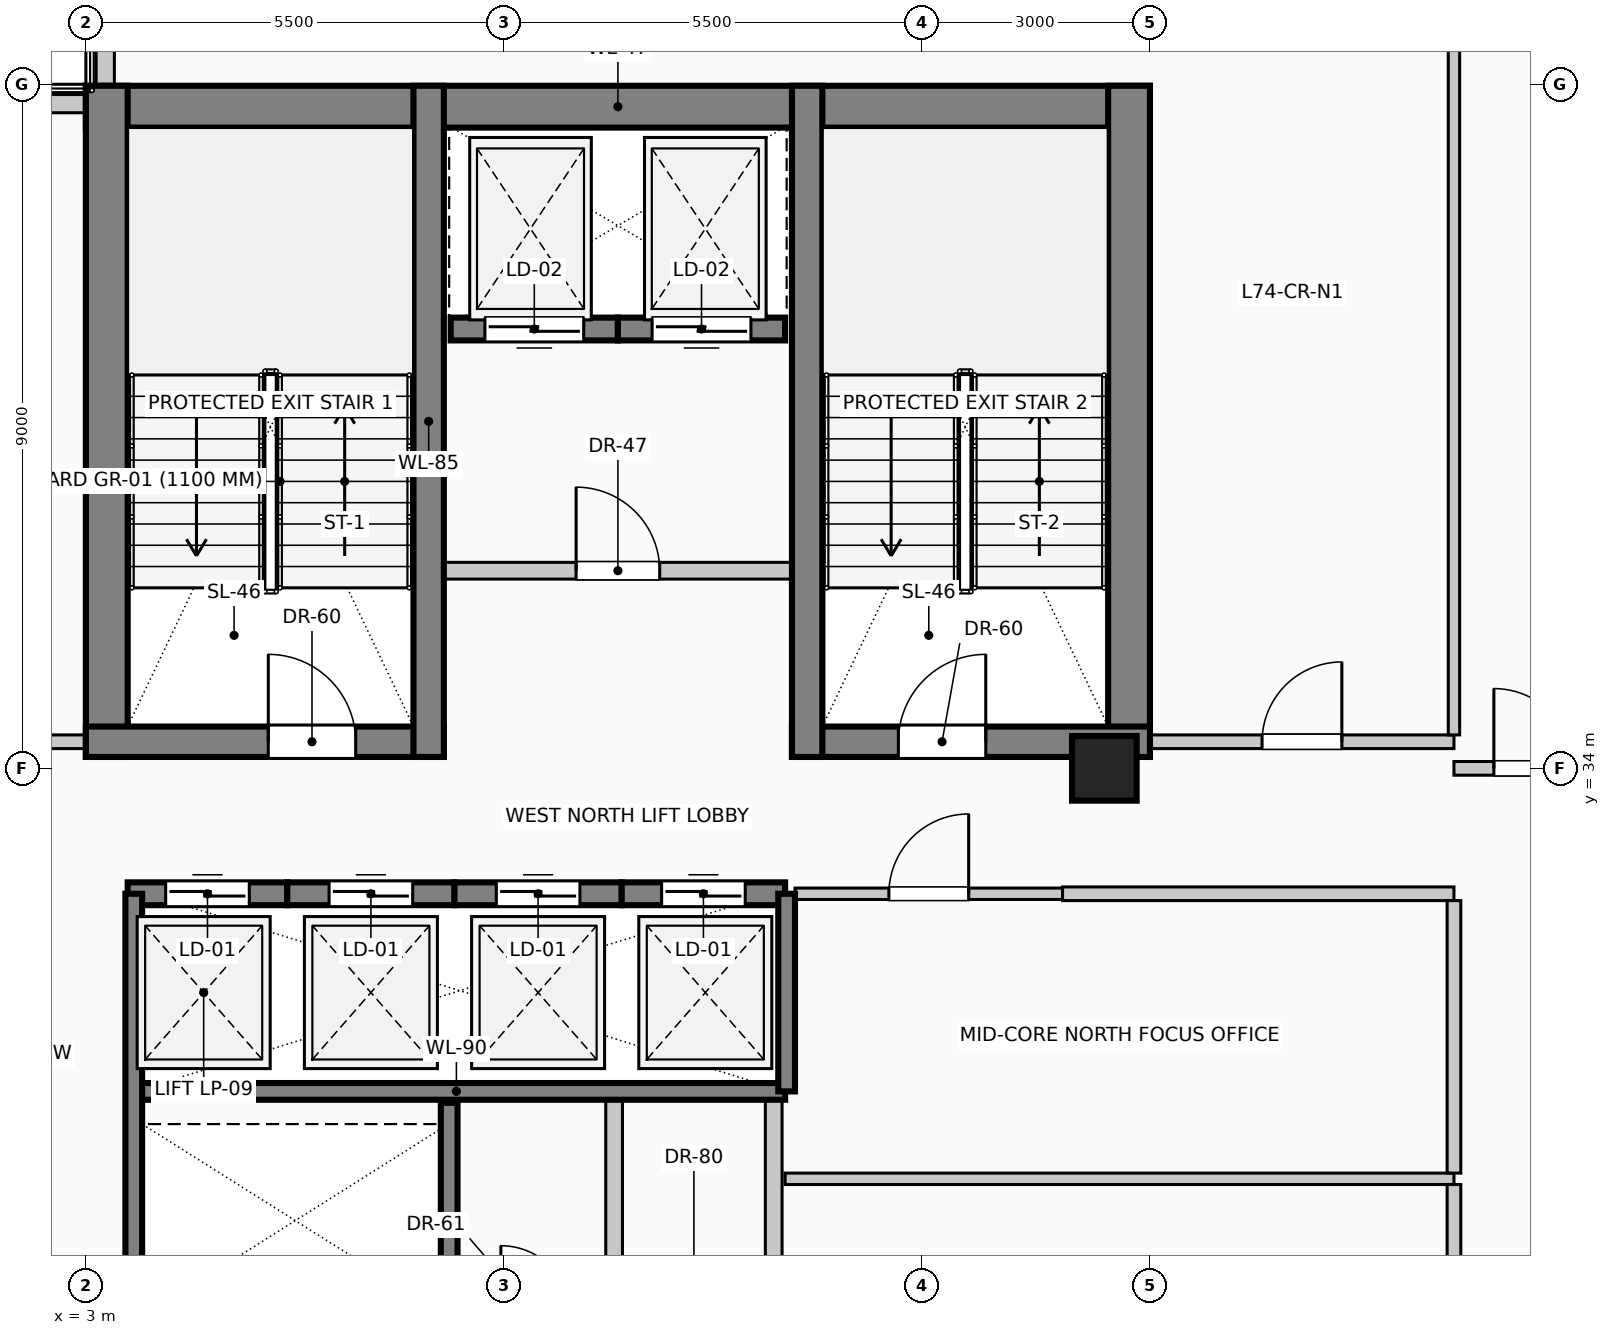
"""IFC4 building model, lengths in metres.
Left out: names, types, materials, properties, quantities, classifications, styles, units other than length and angle.
Written with IfcOpenShell. Run it as: python <this file> out.ifc"""

import sys

from ifc_helpers import new_model, si_unit, direction, frame, frame_2d, origin, origin_2d, place, context, subcontext, project, spatial, rectangle, circle, extrude, element, fill, save


model = new_model("IFC4")
c1 = context("Model", 3, precision=1e-05, world=origin(), true_north=direction((0.0, 1.0)))
c2 = subcontext(c1, "Body", "Model", "MODEL_VIEW")
j1 = project(units=[si_unit("LENGTHUNIT", "METRE"), si_unit("PLANEANGLEUNIT", "RADIAN")], contexts=[c1])
p1 = place(None, origin())
s1 = spatial("IfcSite", under=j1, at=p1, CompositionType="ELEMENT")
p2 = place(p1, origin())
s2 = spatial("IfcBuilding", under=s1, at=p2, CompositionType="ELEMENT")
p3 = place(p2, frame((0.0, 0.0, 305.0)))
s3 = spatial("IfcBuildingStorey", under=s2, at=p3, CompositionType="ELEMENT", Elevation=305.0)
p4 = place(p3, frame((3.0, 42.705, 0.0), z_axis=(0.0, 0.0, 1.0), x_axis=(1.0, 0.0, 0.0)))
e1 = element("IfcWall", 1, at=p4, inside=s3, PredefinedType="SHEAR", context=c2, shape_type="SweptSolid", body=[
    extrude(rectangle(XDim=14.0, YDim=0.55, at=frame_2d((7.0, 0.0))), origin(), (0.0, 0.0, 1.0), 4.0),
])
for number, where, z_axis, x_axis in (
    (2, (3.275, 34.15, 0.0), (0.0, 0.0, 1.0), (0.0, 1.0, 0.0)),
    (3, (16.725, 34.15, 0.0), (0.0, 0.0, 1.0), (0.0, 1.0, 0.0)),
):
    element("IfcWall", number, at=place(p3, frame(where, z_axis=z_axis, x_axis=x_axis)), inside=s3, PredefinedType="SHEAR", context=c2, shape_type="SweptSolid", body=[
        extrude(rectangle(XDim=8.83, YDim=0.55, at=frame_2d((4.415, 0.0))), origin(), (0.0, 0.0, 1.0), 4.0),
    ])
p5 = place(p3, frame((3.0, 34.35, 0.0), z_axis=(0.0, 0.0, 1.0), x_axis=(1.0, 0.0, 0.0)))
e4 = element("IfcWall", 4, at=p5, inside=s3, PredefinedType="SHEAR", context=c2, shape_type="SweptSolid", body=[
    extrude(rectangle(XDim=4.71, YDim=0.4, at=frame_2d((2.355, 0.0))), origin(), (0.0, 0.0, 1.0), 4.0),
])
p6 = place(p5, frame((2.4, 0.0, 0.0)))
e5 = element("IfcOpeningElement", 5, at=p6, cuts=e4, PredefinedType="OPENING", context=c2, shape_type="SweptSolid", body=[
    extrude(rectangle(XDim=1.15, YDim=2.2, at=frame_2d((0.575, 1.1))), frame((0.0, 0.21, 0.0), z_axis=(0.0, -1.0, 0.0), x_axis=(1.0, 0.0, 0.0)), (0.0, 0.0, 1.0), 0.42),
])
p7 = place(p3, frame((12.29, 34.35, 0.0), z_axis=(0.0, 0.0, 1.0), x_axis=(1.0, 0.0, 0.0)))
e6 = element("IfcWall", 6, at=p7, inside=s3, PredefinedType="SHEAR", context=c2, shape_type="SweptSolid", body=[
    extrude(rectangle(XDim=4.71, YDim=0.4, at=frame_2d((2.355, 0.0))), origin(), (0.0, 0.0, 1.0), 4.0),
])
p8 = place(p7, frame((1.4, 0.0, 0.0)))
e7 = element("IfcOpeningElement", 7, at=p8, cuts=e6, PredefinedType="OPENING", context=c2, shape_type="SweptSolid", body=[
    extrude(rectangle(XDim=1.15, YDim=2.2, at=frame_2d((0.575, 1.1))), frame((0.0, 0.21, 0.0), z_axis=(0.0, -1.0, 0.0), x_axis=(1.0, 0.0, 0.0)), (0.0, 0.0, 1.0), 0.42),
])
for number, where, z_axis, x_axis in (
    (8, (7.51, 34.15, 0.0), (0.0, 0.0, 1.0), (0.0, 1.0, 0.0)),
    (9, (12.49, 34.15, 0.0), (0.0, 0.0, 1.0), (0.0, 1.0, 0.0)),
):
    element("IfcWall", number, at=place(p3, frame(where, z_axis=z_axis, x_axis=x_axis)), inside=s3, PredefinedType="SHEAR", context=c2, shape_type="SweptSolid", body=[
        extrude(rectangle(XDim=8.83, YDim=0.4, at=frame_2d((4.415, 0.0))), origin(), (0.0, 0.0, 1.0), 4.0),
    ])
p9 = place(p3, frame((16.4, 34.0, 0.0), z_axis=(0.0, 0.0, 1.0), x_axis=(1.0, 0.0, 0.0)))
e10 = element("IfcColumn", 10, at=p9, inside=s3, PredefinedType="COLUMN", context=c2, shape_type="SweptSolid", body=[
    extrude(circle(Radius=0.425, at=origin_2d()), origin(), (0.0, 0.0, 1.0), 4.0),
])
p10 = place(p3, frame((0.6, 42.745, 0.0), z_axis=(0.0, 0.0, 1.0), x_axis=(1.0, 0.0, 0.0)))
e11 = element("IfcWall", 11, at=p10, inside=s3, PredefinedType="SOLIDWALL", context=c2, shape_type="SweptSolid", body=[
    extrude(rectangle(XDim=2.395, YDim=0.24, at=frame_2d((1.198, 0.0))), origin(), (0.0, 0.0, 1.0), 3.775),
])
p11 = place(p3, frame((3.255, 42.985, 0.0), z_axis=(0.0, 0.0, 1.0), x_axis=(0.0, 1.0, 0.0)))
e12 = element("IfcWall", 12, at=p11, inside=s3, PredefinedType="SOLIDWALL", context=c2, shape_type="SweptSolid", body=[
    extrude(rectangle(XDim=2.415, YDim=0.24, at=frame_2d((1.208, 0.0))), origin(), (0.0, 0.0, 1.0), 3.775),
])
p12 = place(p3, frame((3.55, 32.35, 0.0), z_axis=(0.0, 0.0, 1.0), x_axis=(1.0, 0.0, 0.0)))
e13 = element("IfcWall", 13, at=p12, inside=s3, PredefinedType="SOLIDWALL", context=c2, shape_type="SweptSolid", body=[
    extrude(rectangle(XDim=2.1, YDim=0.3, at=frame_2d((1.05, 0.0))), origin(), (0.0, 0.0, 1.0), 4.0),
])
p13 = place(p12, frame((0.5, 0.0, 0.0)))
e14 = element("IfcOpeningElement", 14, at=p13, cuts=e13, PredefinedType="OPENING", context=c2, shape_type="SweptSolid", body=[
    extrude(rectangle(XDim=1.1, YDim=2.2, at=frame_2d((0.55, 1.1))), frame((0.0, 0.16, 0.0), z_axis=(0.0, -1.0, 0.0), x_axis=(1.0, 0.0, 0.0)), (0.0, 0.0, 1.0), 0.32),
])
p14 = place(p3, frame((5.65, 32.35, 0.0), z_axis=(0.0, 0.0, 1.0), x_axis=(1.0, 0.0, 0.0)))
e15 = element("IfcWall", 15, at=p14, inside=s3, PredefinedType="SOLIDWALL", context=c2, shape_type="SweptSolid", body=[
    extrude(rectangle(XDim=2.2, YDim=0.3, at=frame_2d((1.1, 0.0))), origin(), (0.0, 0.0, 1.0), 4.0),
])
p15 = place(p14, frame((0.55, 0.0, 0.0)))
e16 = element("IfcOpeningElement", 16, at=p15, cuts=e15, PredefinedType="OPENING", context=c2, shape_type="SweptSolid", body=[
    extrude(rectangle(XDim=1.1, YDim=2.2, at=frame_2d((0.55, 1.1))), frame((0.0, 0.16, 0.0), z_axis=(0.0, -1.0, 0.0), x_axis=(1.0, 0.0, 0.0)), (0.0, 0.0, 1.0), 0.32),
])
p16 = place(p3, frame((7.85, 32.35, 0.0), z_axis=(0.0, 0.0, 1.0), x_axis=(1.0, 0.0, 0.0)))
e17 = element("IfcWall", 17, at=p16, inside=s3, PredefinedType="SOLIDWALL", context=c2, shape_type="SweptSolid", body=[
    extrude(rectangle(XDim=2.2, YDim=0.3, at=frame_2d((1.1, 0.0))), origin(), (0.0, 0.0, 1.0), 4.0),
])
p17 = place(p16, frame((0.55, 0.0, 0.0)))
e18 = element("IfcOpeningElement", 18, at=p17, cuts=e17, PredefinedType="OPENING", context=c2, shape_type="SweptSolid", body=[
    extrude(rectangle(XDim=1.1, YDim=2.2, at=frame_2d((0.55, 1.1))), frame((0.0, 0.16, 0.0), z_axis=(0.0, -1.0, 0.0), x_axis=(1.0, 0.0, 0.0)), (0.0, 0.0, 1.0), 0.32),
])
p18 = place(p3, frame((10.05, 32.35, 0.0), z_axis=(0.0, 0.0, 1.0), x_axis=(1.0, 0.0, 0.0)))
e19 = element("IfcWall", 19, at=p18, inside=s3, PredefinedType="SOLIDWALL", context=c2, shape_type="SweptSolid", body=[
    extrude(rectangle(XDim=2.15, YDim=0.3, at=frame_2d((1.075, 0.0))), origin(), (0.0, 0.0, 1.0), 4.0),
])
p19 = place(p18, frame((0.525, 0.0, 0.0)))
e20 = element("IfcOpeningElement", 20, at=p19, cuts=e19, PredefinedType="OPENING", context=c2, shape_type="SweptSolid", body=[
    extrude(rectangle(XDim=1.1, YDim=2.2, at=frame_2d((0.55, 1.1))), frame((0.0, 0.16, 0.0), z_axis=(0.0, -1.0, 0.0), x_axis=(1.0, 0.0, 0.0)), (0.0, 0.0, 1.0), 0.32),
])
p20 = place(p3, frame((10.0, 39.78, 0.0), z_axis=(0.0, 0.0, 1.0), x_axis=(-1.0, 0.0, 0.0)))
e21 = element("IfcWall", 21, at=p20, inside=s3, PredefinedType="SOLIDWALL", context=c2, shape_type="SweptSolid", body=[
    extrude(rectangle(XDim=2.2, YDim=0.3, at=frame_2d((1.1, 0.0))), origin(), (0.0, 0.0, 1.0), 4.0),
])
p21 = place(p20, frame((0.45, 0.0, 0.0)))
e22 = element("IfcOpeningElement", 22, at=p21, cuts=e21, PredefinedType="OPENING", context=c2, shape_type="SweptSolid", body=[
    extrude(rectangle(XDim=1.3, YDim=2.25, at=frame_2d((0.65, 1.125))), frame((0.0, 0.16, 0.0), z_axis=(0.0, -1.0, 0.0), x_axis=(1.0, 0.0, 0.0)), (0.0, 0.0, 1.0), 0.32),
])
p22 = place(p3, frame((12.2, 39.78, 0.0), z_axis=(0.0, 0.0, 1.0), x_axis=(-1.0, 0.0, 0.0)))
e23 = element("IfcWall", 23, at=p22, inside=s3, PredefinedType="SOLIDWALL", context=c2, shape_type="SweptSolid", body=[
    extrude(rectangle(XDim=2.2, YDim=0.3, at=frame_2d((1.1, 0.0))), origin(), (0.0, 0.0, 1.0), 4.0),
])
p23 = place(p22, frame((0.45, 0.0, 0.0)))
e24 = element("IfcOpeningElement", 24, at=p23, cuts=e23, PredefinedType="OPENING", context=c2, shape_type="SweptSolid", body=[
    extrude(rectangle(XDim=1.3, YDim=2.25, at=frame_2d((0.65, 1.125))), frame((0.0, 0.16, 0.0), z_axis=(0.0, -1.0, 0.0), x_axis=(1.0, 0.0, 0.0)), (0.0, 0.0, 1.0), 0.32),
])
p24 = place(p3, frame((3.55, 29.75, 0.0), z_axis=(0.0, 0.0, 1.0), x_axis=(1.0, 0.0, 0.0)))
e25 = element("IfcWall", 25, at=p24, inside=s3, PredefinedType="SOLIDWALL", context=c2, shape_type="SweptSolid", body=[
    extrude(rectangle(XDim=8.65, YDim=0.22, at=frame_2d((4.325, 0.0))), origin(), (0.0, 0.0, 1.0), 4.0),
])
p25 = place(p3, frame((3.63, 26.8, 0.0), z_axis=(0.0, 0.0, 1.0), x_axis=(0.0, 1.0, 0.0)))
e26 = element("IfcWall", 26, at=p25, inside=s3, PredefinedType="SOLIDWALL", context=c2, shape_type="SweptSolid", body=[
    extrude(rectangle(XDim=5.55, YDim=0.22, at=frame_2d((2.775, 0.0))), origin(), (0.0, 0.0, 1.0), 4.0),
])
p26 = place(p3, frame((7.78, 26.8, 0.0), z_axis=(0.0, 0.0, 1.0), x_axis=(0.0, 1.0, 0.0)))
e27 = element("IfcWall", 27, at=p26, inside=s3, PredefinedType="SOLIDWALL", context=c2, shape_type="SweptSolid", body=[
    extrude(rectangle(XDim=2.8, YDim=0.22, at=frame_2d((1.4, 0.0))), origin(), (0.0, 0.0, 1.0), 4.0),
])
p27 = place(p3, frame((12.22, 29.75, 0.0), z_axis=(0.0, 0.0, 1.0), x_axis=(0.0, 1.0, 0.0)))
e28 = element("IfcWall", 28, at=p27, inside=s3, PredefinedType="SOLIDWALL", context=c2, shape_type="SweptSolid", body=[
    extrude(rectangle(XDim=2.6, YDim=0.22, at=frame_2d((1.3, 0.0))), origin(), (0.0, 0.0, 1.0), 4.0),
])
p28 = place(p3, frame((7.51, 36.6, 0.0), z_axis=(0.0, 0.0, 1.0), x_axis=(1.0, 0.0, 0.0)))
e29 = element("IfcWall", 29, at=p28, inside=s3, PredefinedType="PARTITIONING", context=c2, shape_type="SweptSolid", body=[
    extrude(rectangle(XDim=4.98, YDim=0.22, at=frame_2d((2.49, 0.0))), origin(), (0.0, 0.0, 1.0), 3.775),
])
p29 = place(p28, frame((1.94, 0.0, 0.0)))
e30 = element("IfcOpeningElement", 30, at=p29, cuts=e29, PredefinedType="OPENING", context=c2, shape_type="SweptSolid", body=[
    extrude(rectangle(XDim=1.1, YDim=2.2, at=frame_2d((0.55, 1.1))), frame((0.0, 0.12, 0.0), z_axis=(0.0, -1.0, 0.0), x_axis=(1.0, 0.0, 0.0)), (0.0, 0.0, 1.0), 0.24),
])
p30 = place(p3, frame((12.2, 28.6, 0.0), z_axis=(0.0, 0.0, 1.0), x_axis=(1.0, 0.0, 0.0)))
e31 = element("IfcWall", 31, at=p30, inside=s3, PredefinedType="PARTITIONING", context=c2, shape_type="SweptSolid", body=[
    extrude(rectangle(XDim=8.8, YDim=0.15, at=frame_2d((4.4, 0.0))), origin(), (0.0, 0.0, 1.0), 3.775),
])
p31 = place(p3, frame((12.33, 32.35, 0.0), z_axis=(0.0, 0.0, 1.0), x_axis=(1.0, 0.0, 0.0)))
e32 = element("IfcWall", 32, at=p31, inside=s3, PredefinedType="PARTITIONING", context=c2, shape_type="SweptSolid", body=[
    extrude(rectangle(XDim=3.52, YDim=0.15, at=frame_2d((1.76, 0.0))), origin(), (0.0, 0.0, 1.0), 3.775),
])
p32 = place(p31, frame((1.235, 0.0, 0.0)))
e33 = element("IfcOpeningElement", 33, at=p32, cuts=e32, PredefinedType="OPENING", context=c2, shape_type="SweptSolid", body=[
    extrude(rectangle(XDim=1.05, YDim=2.15, at=frame_2d((0.525, 1.075))), frame((0.0, 0.085, 0.0), z_axis=(0.0, -1.0, 0.0), x_axis=(1.0, 0.0, 0.0)), (0.0, 0.0, 1.0), 0.17),
])
p33 = place(p3, frame((15.85, 32.35, 0.0), z_axis=(0.0, 0.0, 1.0), x_axis=(1.0, 0.0, 0.0)))
e34 = element("IfcWall", 34, at=p33, inside=s3, PredefinedType="PARTITIONING", context=c2, shape_type="SweptSolid", body=[
    extrude(rectangle(XDim=5.15, YDim=0.18, at=frame_2d((2.575, 0.0))), origin(), (0.0, 0.0, 1.0), 3.775),
])
p34 = place(p3, frame((21.0, 34.0, 0.0), z_axis=(0.0, 0.0, 1.0), x_axis=(1.0, 0.0, 0.0)))
e35 = element("IfcWall", 35, at=p34, inside=s3, PredefinedType="PARTITIONING", context=c2, shape_type="SweptSolid", body=[
    extrude(rectangle(XDim=2.1, YDim=0.18, at=frame_2d((1.05, 0.0))), origin(), (0.0, 0.0, 1.0), 3.27),
])
p35 = place(p34, frame((0.525, 0.0, 0.0)))
e36 = element("IfcOpeningElement", 36, at=p35, cuts=e35, PredefinedType="OPENING", context=c2, shape_type="SweptSolid", body=[
    extrude(rectangle(XDim=1.05, YDim=2.15, at=frame_2d((0.525, 1.075))), frame((0.0, 0.1, 0.0), z_axis=(0.0, -1.0, 0.0), x_axis=(1.0, 0.0, 0.0)), (0.0, 0.0, 1.0), 0.2),
])
p36 = place(p3, frame((1.05, 34.35, 0.0), z_axis=(0.0, 0.0, 1.0), x_axis=(1.0, 0.0, 0.0)))
e37 = element("IfcWall", 37, at=p36, inside=s3, PredefinedType="PARTITIONING", context=c2, shape_type="SweptSolid", body=[
    extrude(rectangle(XDim=1.95, YDim=0.18, at=frame_2d((0.975, 0.0))), origin(), (0.0, 0.0, 1.0), 3.775),
])
p37 = place(p3, frame((17.0, 34.35, 0.0), z_axis=(0.0, 0.0, 1.0), x_axis=(1.0, 0.0, 0.0)))
e38 = element("IfcWall", 38, at=p37, inside=s3, PredefinedType="PARTITIONING", context=c2, shape_type="SweptSolid", body=[
    extrude(rectangle(XDim=4.0, YDim=0.18, at=frame_2d((2.0, 0.0))), origin(), (0.0, 0.0, 1.0), 3.775),
])
p38 = place(p37, frame((1.475, 0.0, 0.0)))
e39 = element("IfcOpeningElement", 39, at=p38, cuts=e38, PredefinedType="OPENING", context=c2, shape_type="SweptSolid", body=[
    extrude(rectangle(XDim=1.05, YDim=2.15, at=frame_2d((0.525, 1.075))), frame((0.0, 0.1, 0.0), z_axis=(0.0, -1.0, 0.0), x_axis=(1.0, 0.0, 0.0)), (0.0, 0.0, 1.0), 0.2),
])
for number, where, z_axis, x_axis in (
    (40, (9.95, 26.91, 0.0), (0.0, 0.0, 1.0), (0.0, 1.0, 0.0)),
    (41, (12.05, 26.91, 0.0), (0.0, 0.0, 1.0), (0.0, 1.0, 0.0)),
):
    element("IfcWall", number, at=place(p3, frame(where, z_axis=z_axis, x_axis=x_axis)), inside=s3, PredefinedType="PARTITIONING", context=c2, shape_type="SweptSolid", body=[
        extrude(rectangle(XDim=2.73, YDim=0.22, at=frame_2d((1.365, 0.0))), origin(), (0.0, 0.0, 1.0), 3.775),
    ])
p39 = place(p3, frame((21.0, 24.875, 0.0), z_axis=(0.0, 0.0, 1.0), x_axis=(0.0, 1.0, 0.0)))
e42 = element("IfcWall", 42, at=p39, inside=s3, PredefinedType="PARTITIONING", context=c2, shape_type="SweptSolid", body=[
    extrude(rectangle(XDim=3.65, YDim=0.18, at=frame_2d((1.825, 0.0))), origin(), (0.0, 0.0, 1.0), 3.775),
])
p40 = place(p3, frame((21.0, 28.675, 0.0), z_axis=(0.0, 0.0, 1.0), x_axis=(0.0, 1.0, 0.0)))
e43 = element("IfcWall", 43, at=p40, inside=s3, PredefinedType="PARTITIONING", context=c2, shape_type="SweptSolid", body=[
    extrude(rectangle(XDim=3.585, YDim=0.18, at=frame_2d((1.792, 0.0))), origin(), (0.0, 0.0, 1.0), 3.775),
])
p41 = place(p3, frame((21.0, 34.44, 0.0), z_axis=(0.0, 0.0, 1.0), x_axis=(0.0, 1.0, 0.0)))
e44 = element("IfcWall", 44, at=p41, inside=s3, PredefinedType="PARTITIONING", context=c2, shape_type="SweptSolid", body=[
    extrude(rectangle(XDim=10.84, YDim=0.15, at=frame_2d((5.42, 0.0))), origin(), (0.0, 0.0, 1.0), 3.775),
])
p42 = place(p13, origin())
e45 = element("IfcDoor", 45, at=p42, inside=s3, OperationType="SLIDING_TO_LEFT", PredefinedType="DOOR", context=c2, shape_type="SweptSolid", body=[
    extrude(rectangle(XDim=1.1, YDim=2.2, at=frame_2d((0.55, 1.1))), frame((0.0, 0.025, 0.0), z_axis=(0.0, -1.0, 0.0), x_axis=(1.0, 0.0, 0.0)), (0.0, 0.0, 1.0), 0.05),
])
fill(e14, e45)
p43 = place(p15, origin())
e46 = element("IfcDoor", 46, at=p43, inside=s3, OperationType="SLIDING_TO_RIGHT", PredefinedType="DOOR", context=c2, shape_type="SweptSolid", body=[
    extrude(rectangle(XDim=1.1, YDim=2.2, at=frame_2d((0.55, 1.1))), frame((0.0, 0.025, 0.0), z_axis=(0.0, -1.0, 0.0), x_axis=(1.0, 0.0, 0.0)), (0.0, 0.0, 1.0), 0.05),
])
fill(e16, e46)
p44 = place(p17, origin())
e47 = element("IfcDoor", 47, at=p44, inside=s3, OperationType="SLIDING_TO_LEFT", PredefinedType="DOOR", context=c2, shape_type="SweptSolid", body=[
    extrude(rectangle(XDim=1.1, YDim=2.2, at=frame_2d((0.55, 1.1))), frame((0.0, 0.025, 0.0), z_axis=(0.0, -1.0, 0.0), x_axis=(1.0, 0.0, 0.0)), (0.0, 0.0, 1.0), 0.05),
])
fill(e18, e47)
p45 = place(p19, origin())
e48 = element("IfcDoor", 48, at=p45, inside=s3, OperationType="SLIDING_TO_RIGHT", PredefinedType="DOOR", context=c2, shape_type="SweptSolid", body=[
    extrude(rectangle(XDim=1.1, YDim=2.2, at=frame_2d((0.55, 1.1))), frame((0.0, 0.025, 0.0), z_axis=(0.0, -1.0, 0.0), x_axis=(1.0, 0.0, 0.0)), (0.0, 0.0, 1.0), 0.05),
])
fill(e20, e48)
p46 = place(p21, origin())
e49 = element("IfcDoor", 49, at=p46, inside=s3, OperationType="SLIDING_TO_LEFT", PredefinedType="DOOR", context=c2, shape_type="SweptSolid", body=[
    extrude(rectangle(XDim=1.3, YDim=2.25, at=frame_2d((0.65, 1.125))), frame((0.0, 0.025, 0.0), z_axis=(0.0, -1.0, 0.0), x_axis=(1.0, 0.0, 0.0)), (0.0, 0.0, 1.0), 0.05),
])
fill(e22, e49)
p47 = place(p23, origin())
e50 = element("IfcDoor", 50, at=p47, inside=s3, OperationType="SLIDING_TO_RIGHT", PredefinedType="DOOR", context=c2, shape_type="SweptSolid", body=[
    extrude(rectangle(XDim=1.3, YDim=2.25, at=frame_2d((0.65, 1.125))), frame((0.0, 0.025, 0.0), z_axis=(0.0, -1.0, 0.0), x_axis=(1.0, 0.0, 0.0)), (0.0, 0.0, 1.0), 0.05),
])
fill(e24, e50)
p48 = place(p6, origin())
e51 = element("IfcDoor", 51, at=p48, inside=s3, OperationType="SINGLE_SWING_LEFT", PredefinedType="DOOR", context=c2, shape_type="SweptSolid", body=[
    extrude(rectangle(XDim=1.15, YDim=2.2, at=frame_2d((0.575, 1.1))), frame((0.0, 0.025, 0.0), z_axis=(0.0, -1.0, 0.0), x_axis=(1.0, 0.0, 0.0)), (0.0, 0.0, 1.0), 0.05),
])
fill(e5, e51)
p49 = place(p8, origin())
e52 = element("IfcDoor", 52, at=p49, inside=s3, OperationType="SINGLE_SWING_RIGHT", PredefinedType="DOOR", context=c2, shape_type="SweptSolid", body=[
    extrude(rectangle(XDim=1.15, YDim=2.2, at=frame_2d((0.575, 1.1))), frame((0.0, 0.025, 0.0), z_axis=(0.0, -1.0, 0.0), x_axis=(1.0, 0.0, 0.0)), (0.0, 0.0, 1.0), 0.05),
])
fill(e7, e52)
p50 = place(p29, origin())
e53 = element("IfcDoor", 53, at=p50, inside=s3, OperationType="SINGLE_SWING_LEFT", PredefinedType="DOOR", context=c2, shape_type="SweptSolid", body=[
    extrude(rectangle(XDim=1.1, YDim=2.2, at=frame_2d((0.55, 1.1))), frame((0.0, 0.025, 0.0), z_axis=(0.0, -1.0, 0.0), x_axis=(1.0, 0.0, 0.0)), (0.0, 0.0, 1.0), 0.05),
])
fill(e30, e53)
p51 = place(p32, origin())
e54 = element("IfcDoor", 54, at=p51, inside=s3, OperationType="SINGLE_SWING_RIGHT", PredefinedType="DOOR", context=c2, shape_type="SweptSolid", body=[
    extrude(rectangle(XDim=1.05, YDim=2.15, at=frame_2d((0.525, 1.075))), frame((0.0, 0.025, 0.0), z_axis=(0.0, -1.0, 0.0), x_axis=(1.0, 0.0, 0.0)), (0.0, 0.0, 1.0), 0.05),
])
fill(e33, e54)
p52 = place(p35, origin())
e55 = element("IfcDoor", 55, at=p52, inside=s3, OperationType="SINGLE_SWING_LEFT", PredefinedType="DOOR", context=c2, shape_type="SweptSolid", body=[
    extrude(rectangle(XDim=1.05, YDim=2.15, at=frame_2d((0.525, 1.075))), frame((0.0, 0.025, 0.0), z_axis=(0.0, -1.0, 0.0), x_axis=(1.0, 0.0, 0.0)), (0.0, 0.0, 1.0), 0.05),
])
fill(e36, e55)
p53 = place(p38, origin())
e56 = element("IfcDoor", 56, at=p53, inside=s3, OperationType="SINGLE_SWING_RIGHT", PredefinedType="DOOR", context=c2, shape_type="SweptSolid", body=[
    extrude(rectangle(XDim=1.05, YDim=2.15, at=frame_2d((0.525, 1.075))), frame((0.0, 0.025, 0.0), z_axis=(0.0, -1.0, 0.0), x_axis=(1.0, 0.0, 0.0)), (0.0, 0.0, 1.0), 0.05),
])
fill(e39, e56)
save(model, sys.argv[1])
